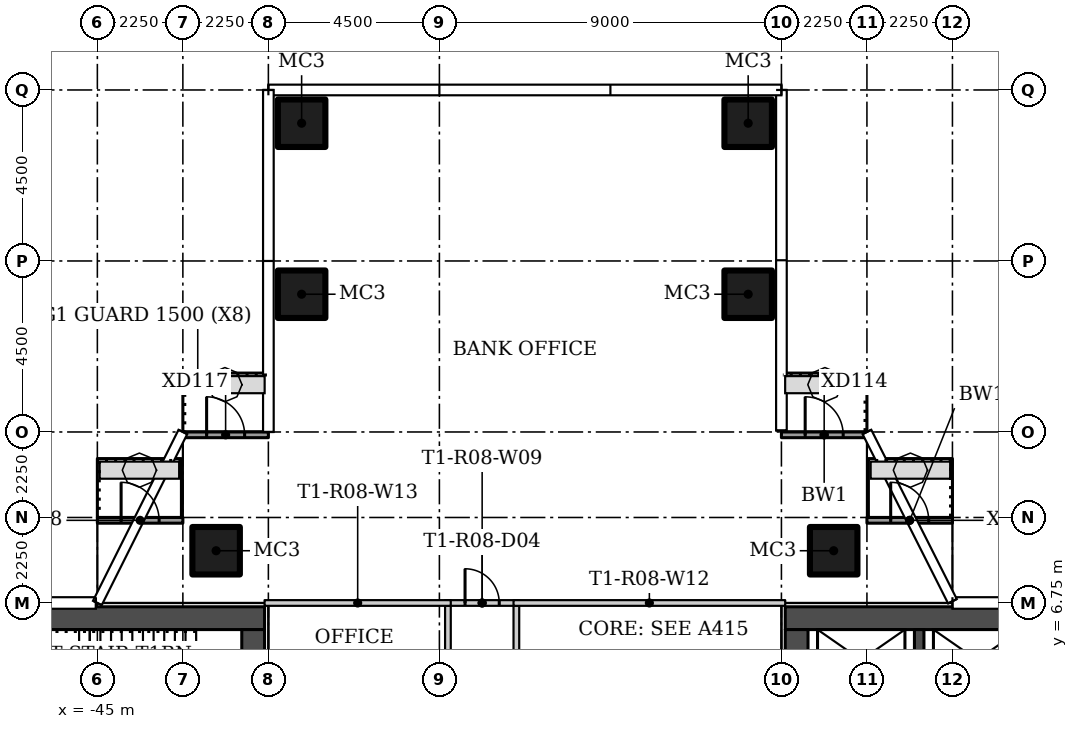
"""IFC4 building model, lengths in metres.
Left out: names, types, materials, properties, quantities, classifications, styles, units other than length and angle.
Written with IfcOpenShell. Run it as: python <this file> out.ifc"""

import sys

from ifc_helpers import new_model, si_unit, direction, frame, frame_2d, origin, origin_2d, place, context, subcontext, project, spatial, rectangle, hollow_rectangle, extrude, element, fill, save


model = new_model("IFC4")
c1 = context("Model", 3, precision=1e-05, world=origin(), true_north=direction((0.0, 1.0)))
c2 = subcontext(c1, "Body", "Model", "MODEL_VIEW")
j1 = project(units=[si_unit("LENGTHUNIT", "METRE"), si_unit("PLANEANGLEUNIT", "RADIAN")], contexts=[c1])
p1 = place(None, origin())
s1 = spatial("IfcSite", under=j1, at=p1, CompositionType="ELEMENT")
p2 = place(p1, origin())
s2 = spatial("IfcBuilding", under=s1, at=p2, CompositionType="ELEMENT")
p3 = place(p2, frame((0.0, 0.0, 85.8)))
s3 = spatial("IfcBuildingStorey", under=s2, at=p3, CompositionType="ELEMENT", Elevation=85.8)
for number, where in (
    (1, (-25.625, 8.125, 0.0)),
    (2, (-41.875, 8.125, 0.0)),
    (3, (-39.625, 14.875, 0.0)),
    (4, (-39.625, 19.375, 0.0)),
    (5, (-27.875, 14.875, 0.0)),
    (6, (-27.875, 19.375, 0.0)),
):
    element("IfcColumn", number, at=place(p3, frame(where)), inside=s3, PredefinedType="COLUMN", context=c2, shape_type="SweptSolid", body=[
        extrude(hollow_rectangle(XDim=1.25, YDim=1.25, WallThickness=0.05, at=origin_2d()), origin(), (0.0, 0.0, 1.0), 3.55),
    ])
for number, where, z_axis, x_axis in (
    (7, (-33.975, 6.675, 0.0), (0.0, 0.0, 1.0), (0.0, -1.0, 0.0)),
    (8, (-35.775, 2.525, 0.0), (0.0, 0.0, 1.0), (0.0, 1.0, 0.0)),
):
    element("IfcWall", number, at=place(p3, frame(where, z_axis=z_axis, x_axis=x_axis)), inside=s3, PredefinedType="PARTITIONING", context=c2, shape_type="SweptSolid", body=[
        extrude(rectangle(XDim=4.15, YDim=0.15, at=frame_2d((2.075, 0.0))), origin(), (0.0, 0.0, 1.0), 3.55),
    ])
p4 = place(p3, frame((-35.85, 6.75, 0.0)))
e9 = element("IfcWall", 9, at=p4, inside=s3, PredefinedType="PARTITIONING", context=c2, shape_type="SweptSolid", body=[
    extrude(rectangle(XDim=1.951, YDim=0.15, at=frame_2d((0.975, 0.0))), origin(), (0.0, 0.0, 1.0), 3.55),
])
p5 = place(p4, frame((0.525, 0.0, 0.0)))
e10 = element("IfcOpeningElement", 10, at=p5, cuts=e9, PredefinedType="OPENING", context=c2, shape_type="SweptSolid", body=[
    extrude(rectangle(XDim=0.9, YDim=2.1, at=frame_2d((0.45, 1.05))), frame((0.0, 0.085, 0.0), z_axis=(0.0, -1.0, 0.0), x_axis=(1.0, 0.0, 0.0)), (0.0, 0.0, 1.0), 0.17),
])
p6 = place(p3, frame((-26.9, 6.75, 0.0), z_axis=(0.0, 0.0, 1.0), x_axis=(-1.0, 0.0, 0.0)))
e11 = element("IfcWall", 11, at=p6, inside=s3, PredefinedType="PARTITIONING", context=c2, shape_type="SweptSolid", body=[
    extrude(rectangle(XDim=7.15, YDim=0.15, at=frame_2d((3.575, 0.0))), origin(), (0.0, 0.0, 1.0), 3.55),
])
p7 = place(p3, frame((-35.7, 6.75, 0.0), z_axis=(0.0, 0.0, 1.0), x_axis=(-1.0, 0.0, 0.0)))
e12 = element("IfcWall", 12, at=p7, inside=s3, PredefinedType="PARTITIONING", context=c2, shape_type="SweptSolid", body=[
    extrude(rectangle(XDim=4.9, YDim=0.15, at=frame_2d((2.45, 0.0))), origin(), (0.0, 0.0, 1.0), 3.55),
])
p8 = place(p3, frame((-24.75, 8.925, 0.0)))
e13 = element("IfcWall", 13, at=p8, inside=s3, PredefinedType="SOLIDWALL", context=c2, shape_type="SweptSolid", body=[
    extrude(rectangle(XDim=2.25, YDim=0.15, at=frame_2d((1.125, 0.0))), origin(), (0.0, 0.0, 1.0), 3.45),
])
p9 = place(p8, frame((0.625, 0.0, 0.0)))
e14 = element("IfcOpeningElement", 14, at=p9, cuts=e13, PredefinedType="OPENING", context=c2, shape_type="SweptSolid", body=[
    extrude(rectangle(XDim=1.0, YDim=2.4, at=frame_2d((0.5, 1.2))), frame((0.0, 0.085, 0.0), z_axis=(0.0, -1.0, 0.0), x_axis=(1.0, 0.0, 0.0)), (0.0, 0.0, 1.0), 0.17),
])
p10 = place(p3, frame((-27.0, 11.175, 0.0)))
e15 = element("IfcWall", 15, at=p10, inside=s3, PredefinedType="SOLIDWALL", context=c2, shape_type="SweptSolid", body=[
    extrude(rectangle(XDim=2.25, YDim=0.15, at=frame_2d((1.125, 0.0))), origin(), (0.0, 0.0, 1.0), 3.45),
])
p11 = place(p10, frame((0.625, 0.0, 0.0)))
e16 = element("IfcOpeningElement", 16, at=p11, cuts=e15, PredefinedType="OPENING", context=c2, shape_type="SweptSolid", body=[
    extrude(rectangle(XDim=1.0, YDim=2.4, at=frame_2d((0.5, 1.2))), frame((0.0, 0.085, 0.0), z_axis=(0.0, -1.0, 0.0), x_axis=(1.0, 0.0, 0.0)), (0.0, 0.0, 1.0), 0.17),
])
p12 = place(p3, frame((-42.75, 11.175, 0.0)))
e17 = element("IfcWall", 17, at=p12, inside=s3, PredefinedType="SOLIDWALL", context=c2, shape_type="SweptSolid", body=[
    extrude(rectangle(XDim=2.25, YDim=0.15, at=frame_2d((1.125, 0.0))), origin(), (0.0, 0.0, 1.0), 3.45),
])
p13 = place(p12, frame((0.625, 0.0, 0.0)))
e18 = element("IfcOpeningElement", 18, at=p13, cuts=e17, PredefinedType="OPENING", context=c2, shape_type="SweptSolid", body=[
    extrude(rectangle(XDim=1.0, YDim=2.4, at=frame_2d((0.5, 1.2))), frame((0.0, 0.085, 0.0), z_axis=(0.0, -1.0, 0.0), x_axis=(1.0, 0.0, 0.0)), (0.0, 0.0, 1.0), 0.17),
])
p14 = place(p3, frame((-45.0, 8.925, 0.0)))
e19 = element("IfcWall", 19, at=p14, inside=s3, PredefinedType="SOLIDWALL", context=c2, shape_type="SweptSolid", body=[
    extrude(rectangle(XDim=2.25, YDim=0.15, at=frame_2d((1.125, 0.0))), origin(), (0.0, 0.0, 1.0), 3.45),
])
p15 = place(p14, frame((0.625, 0.0, 0.0)))
e20 = element("IfcOpeningElement", 20, at=p15, cuts=e19, PredefinedType="OPENING", context=c2, shape_type="SweptSolid", body=[
    extrude(rectangle(XDim=1.0, YDim=2.4, at=frame_2d((0.5, 1.2))), frame((0.0, 0.085, 0.0), z_axis=(0.0, -1.0, 0.0), x_axis=(1.0, 0.0, 0.0)), (0.0, 0.0, 1.0), 0.17),
])
p16 = place(p3, frame((-26.9, 6.35, 0.0)))
e21 = element("IfcWall", 21, at=p16, inside=s3, PredefinedType="SHEAR", context=c2, shape_type="SweptSolid", body=[
    extrude(rectangle(XDim=13.3, YDim=0.6, at=frame_2d((6.65, 0.0))), origin(), (0.0, 0.0, 1.0), 3.55),
])
p17 = place(p3, frame((-26.6, 6.05, 0.0), z_axis=(0.0, 0.0, 1.0), x_axis=(0.0, -1.0, 0.0)))
e22 = element("IfcWall", 22, at=p17, inside=s3, PredefinedType="SHEAR", context=c2, shape_type="SweptSolid", body=[
    extrude(rectangle(XDim=12.1, YDim=0.6, at=frame_2d((6.05, 0.0))), origin(), (0.0, 0.0, 1.0), 3.55),
])
p18 = place(p17, frame((3.9, 0.0, 0.0)))
e23 = element("IfcOpeningElement", 23, at=p18, cuts=e22, PredefinedType="OPENING", context=c2, shape_type="SweptSolid", body=[
    extrude(rectangle(XDim=1.8, YDim=2.4, at=frame_2d((0.9, 1.2))), frame((0.0, 0.31, 0.0), z_axis=(0.0, -1.0, 0.0), x_axis=(1.0, 0.0, 0.0)), (0.0, 0.0, 1.0), 0.62),
])
p19 = place(p3, frame((-23.375, 3.25, 0.0), z_axis=(0.0, 0.0, 1.0), x_axis=(0.0, 1.0, 0.0)))
e24 = element("IfcWall", 24, at=p19, inside=s3, PredefinedType="SHEAR", context=c2, shape_type="SweptSolid", body=[
    extrude(rectangle(XDim=2.8, YDim=0.25, at=frame_2d((1.4, 0.0))), origin(), (0.0, 0.0, 1.0), 3.55),
])
p20 = place(p3, frame((-40.6, 6.35, 0.0), z_axis=(0.0, 0.0, 1.0), x_axis=(-1.0, 0.0, 0.0)))
e25 = element("IfcWall", 25, at=p20, inside=s3, PredefinedType="SHEAR", context=c2, shape_type="SweptSolid", body=[
    extrude(rectangle(XDim=13.3, YDim=0.6, at=frame_2d((6.65, 0.0))), origin(), (0.0, 0.0, 1.0), 3.55),
])
p21 = place(p3, frame((-40.9, -6.05, 0.0), z_axis=(0.0, 0.0, 1.0), x_axis=(0.0, 1.0, 0.0)))
e26 = element("IfcWall", 26, at=p21, inside=s3, PredefinedType="SHEAR", context=c2, shape_type="SweptSolid", body=[
    extrude(rectangle(XDim=12.1, YDim=0.6, at=frame_2d((6.05, 0.0))), origin(), (0.0, 0.0, 1.0), 3.55),
])
p22 = place(p21, frame((6.4, 0.0, 0.0)))
e27 = element("IfcOpeningElement", 27, at=p22, cuts=e26, PredefinedType="OPENING", context=c2, shape_type="SweptSolid", body=[
    extrude(rectangle(XDim=1.8, YDim=2.4, at=frame_2d((0.9, 1.2))), frame((0.0, 0.31, 0.0), z_axis=(0.0, -1.0, 0.0), x_axis=(1.0, 0.0, 0.0)), (0.0, 0.0, 1.0), 0.62),
])
p23 = place(p5, origin())
e28 = element("IfcDoor", 28, at=p23, inside=s3, OperationType="SINGLE_SWING_LEFT", PredefinedType="DOOR", context=c2, shape_type="SweptSolid", body=[
    extrude(rectangle(XDim=0.9, YDim=2.1, at=frame_2d((0.45, 1.05))), frame((0.0, 0.025, 0.0), z_axis=(0.0, -1.0, 0.0), x_axis=(1.0, 0.0, 0.0)), (0.0, 0.0, 1.0), 0.05),
])
fill(e10, e28)
p24 = place(p9, origin())
e29 = element("IfcDoor", 29, at=p24, inside=s3, OperationType="SINGLE_SWING_RIGHT", PredefinedType="DOOR", context=c2, shape_type="SweptSolid", body=[
    extrude(rectangle(XDim=1.0, YDim=2.4, at=frame_2d((0.5, 1.2))), frame((0.0, 0.025, 0.0), z_axis=(0.0, -1.0, 0.0), x_axis=(1.0, 0.0, 0.0)), (0.0, 0.0, 1.0), 0.05),
])
fill(e14, e29)
p25 = place(p11, origin())
e30 = element("IfcDoor", 30, at=p25, inside=s3, OperationType="SINGLE_SWING_LEFT", PredefinedType="DOOR", context=c2, shape_type="SweptSolid", body=[
    extrude(rectangle(XDim=1.0, YDim=2.4, at=frame_2d((0.5, 1.2))), frame((0.0, 0.025, 0.0), z_axis=(0.0, -1.0, 0.0), x_axis=(1.0, 0.0, 0.0)), (0.0, 0.0, 1.0), 0.05),
])
fill(e16, e30)
p26 = place(p13, origin())
e31 = element("IfcDoor", 31, at=p26, inside=s3, OperationType="SINGLE_SWING_LEFT", PredefinedType="DOOR", context=c2, shape_type="SweptSolid", body=[
    extrude(rectangle(XDim=1.0, YDim=2.4, at=frame_2d((0.5, 1.2))), frame((0.0, 0.025, 0.0), z_axis=(0.0, -1.0, 0.0), x_axis=(1.0, 0.0, 0.0)), (0.0, 0.0, 1.0), 0.05),
])
fill(e18, e31)
p27 = place(p15, origin())
e32 = element("IfcDoor", 32, at=p27, inside=s3, OperationType="SINGLE_SWING_RIGHT", PredefinedType="DOOR", context=c2, shape_type="SweptSolid", body=[
    extrude(rectangle(XDim=1.0, YDim=2.4, at=frame_2d((0.5, 1.2))), frame((0.0, 0.025, 0.0), z_axis=(0.0, -1.0, 0.0), x_axis=(1.0, 0.0, 0.0)), (0.0, 0.0, 1.0), 0.05),
])
fill(e20, e32)
save(model, sys.argv[1])
